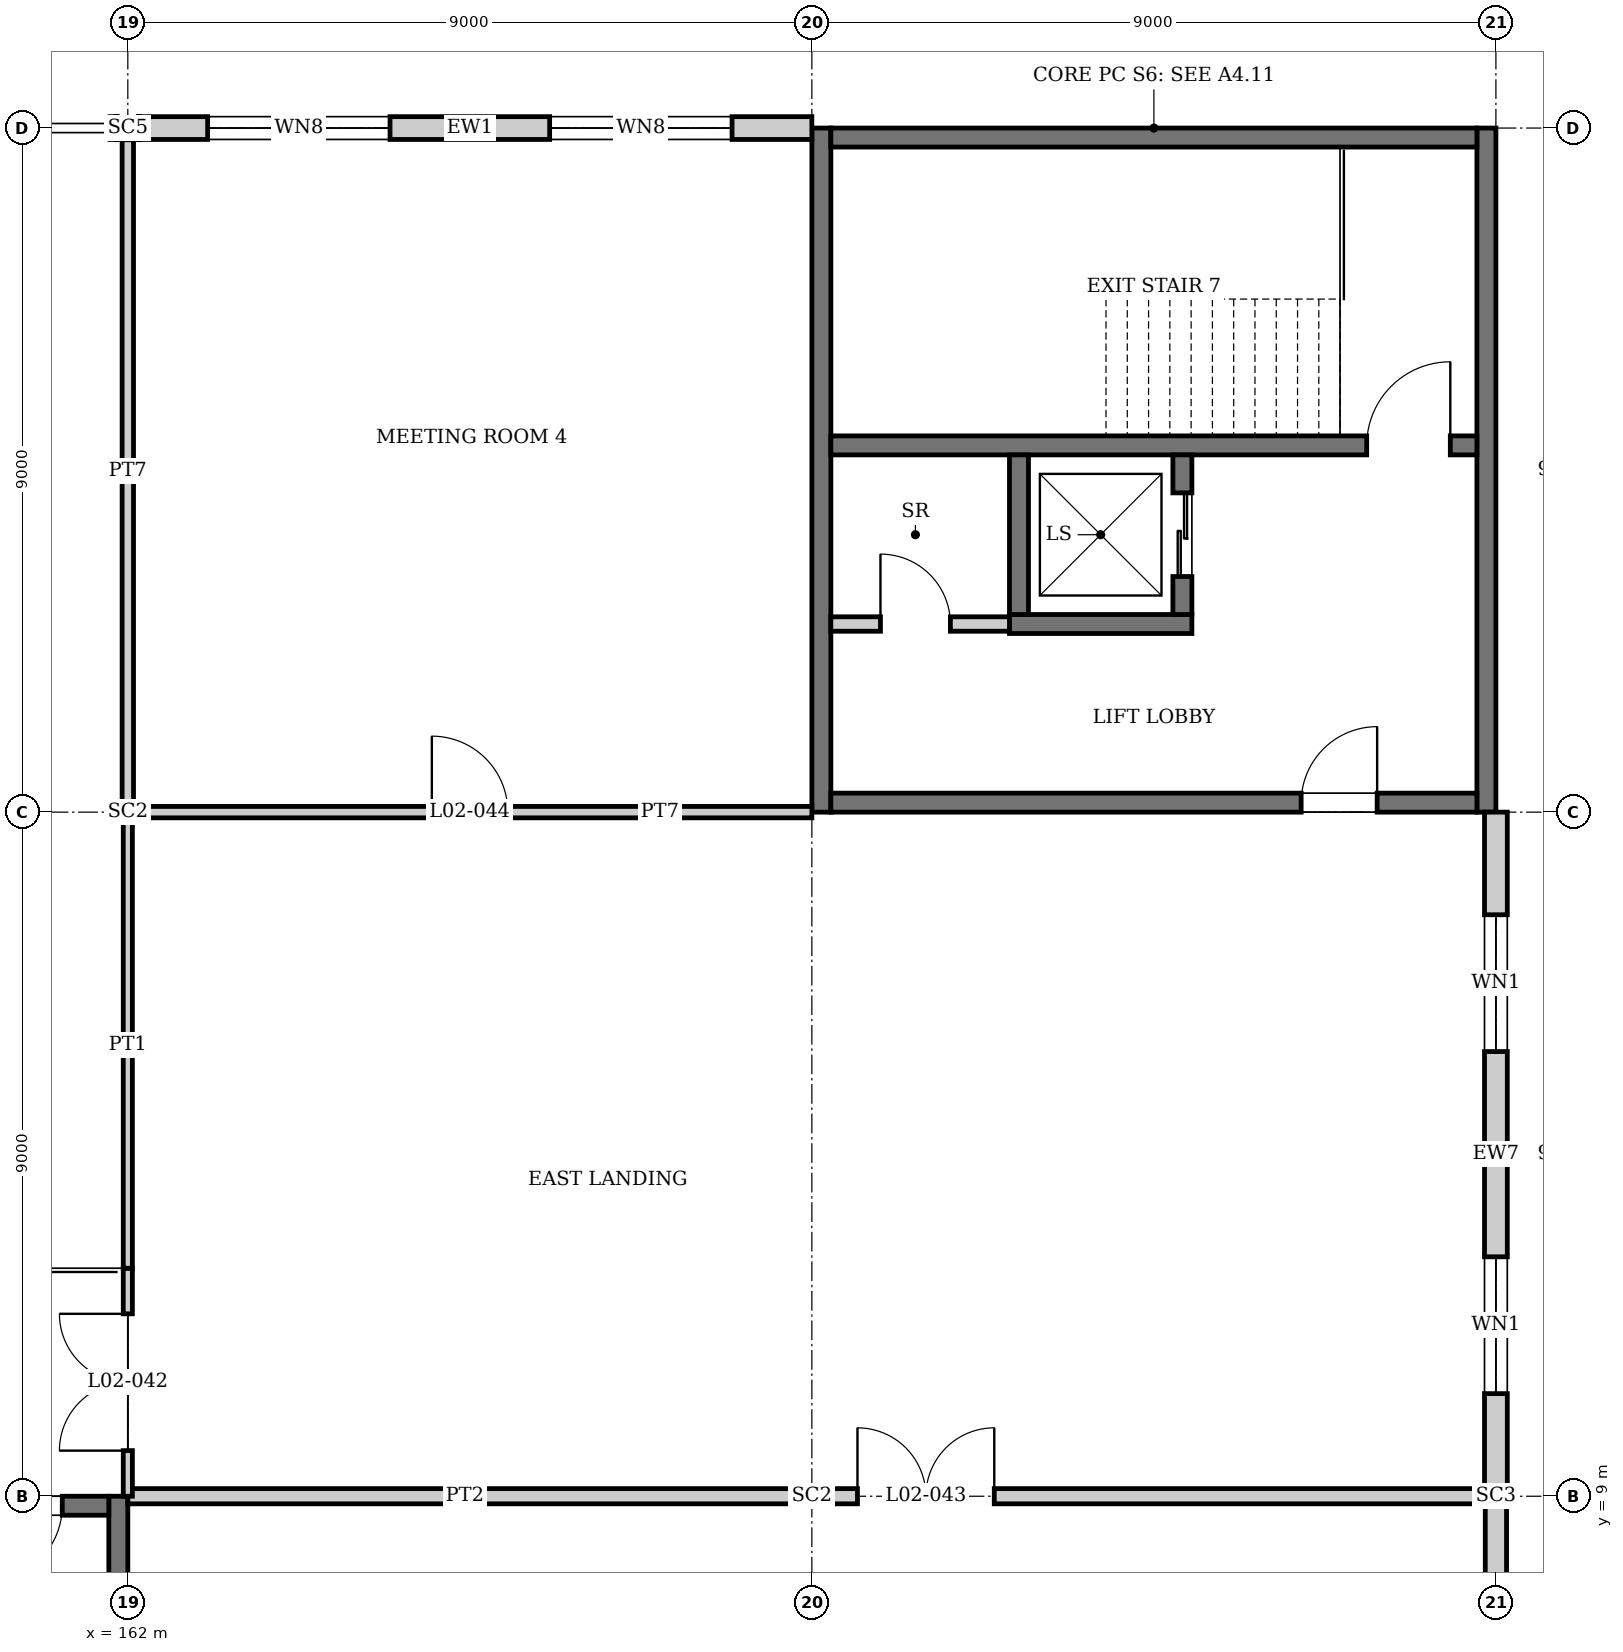
"""IFC4 building model, lengths in metres.
Left out: names, types, materials, properties, quantities, classifications, styles, units other than length and angle.
Written with IfcOpenShell. Run it as: python <this file> out.ifc"""

import sys

from ifc_helpers import new_model, si_unit, direction, frame, frame_2d, origin, origin_2d, place, context, subcontext, project, spatial, rectangle, i_section, extrude, element, fill, save


model = new_model("IFC4")
c1 = context("Model", 3, precision=1e-05, world=origin(), true_north=direction((0.0, 1.0)))
c2 = subcontext(c1, "Body", "Model", "MODEL_VIEW")
j1 = project(units=[si_unit("LENGTHUNIT", "METRE"), si_unit("PLANEANGLEUNIT", "RADIAN")], contexts=[c1])
p1 = place(None, origin())
s1 = spatial("IfcSite", under=j1, at=p1, CompositionType="ELEMENT")
p2 = place(p1, origin())
s2 = spatial("IfcBuilding", under=s1, at=p2, CompositionType="ELEMENT")
p3 = place(p2, frame((0.0, 0.0, 10.5)))
s3 = spatial("IfcBuildingStorey", under=s2, at=p3, CompositionType="ELEMENT", Elevation=10.5)
p4 = place(p3, frame((162.0, 18.0, 0.0), z_axis=(0.0, 0.0, 1.0), x_axis=(0.0, 1.0, 0.0)))
e1 = element("IfcColumn", 1, at=p4, inside=s3, PredefinedType="COLUMN", context=c2, shape_type="SweptSolid", body=[
    extrude(i_section(OverallWidth=0.256, OverallDepth=0.26, WebThickness=0.01, FlangeThickness=0.017, at=origin_2d()), origin(), (0.0, 0.0, 1.0), 4.5),
])
p5 = place(p3, frame((162.0, 27.0, 0.0), z_axis=(0.0, 0.0, 1.0), x_axis=(0.0, 1.0, 0.0)))
e2 = element("IfcColumn", 2, at=p5, inside=s3, PredefinedType="COLUMN", context=c2, shape_type="SweptSolid", body=[
    extrude(i_section(OverallWidth=0.305, OverallDepth=0.308, WebThickness=0.01, FlangeThickness=0.015, at=origin_2d()), origin(), (0.0, 0.0, 1.0), 4.5),
])
p6 = place(p3, frame((171.0, 9.0, 0.0), z_axis=(0.0, 0.0, 1.0), x_axis=(0.0, 1.0, 0.0)))
e3 = element("IfcColumn", 3, at=p6, inside=s3, PredefinedType="COLUMN", context=c2, shape_type="SweptSolid", body=[
    extrude(i_section(OverallWidth=0.256, OverallDepth=0.26, WebThickness=0.01, FlangeThickness=0.017, at=origin_2d()), origin(), (0.0, 0.0, 1.0), 4.5),
])
p7 = place(p3, frame((180.0, 9.0, 0.0), z_axis=(0.0, 0.0, 1.0), x_axis=(0.0, 1.0, 0.0)))
e4 = element("IfcColumn", 4, at=p7, inside=s3, PredefinedType="COLUMN", context=c2, shape_type="SweptSolid", body=[
    extrude(i_section(OverallWidth=0.254, OverallDepth=0.254, WebThickness=0.009, FlangeThickness=0.014, at=origin_2d()), origin(), (0.0, 0.0, 1.0), 4.5),
])
p8 = place(p3, frame((161.875, 0.0, 0.0), z_axis=(0.0, 0.0, 1.0), x_axis=(0.0, 1.0, 0.0)))
e5 = element("IfcWall", 5, at=p8, inside=s3, PredefinedType="SHEAR", context=c2, shape_type="SweptSolid", body=[
    extrude(rectangle(XDim=9.0, YDim=0.25, at=frame_2d((4.5, 0.0))), origin(), (0.0, 0.0, 1.0), 4.35),
])
p9 = place(p3, frame((153.25, 8.875, 0.0), z_axis=(0.0, 0.0, 1.0), x_axis=(1.0, 0.0, 0.0)))
e6 = element("IfcWall", 6, at=p9, inside=s3, PredefinedType="SHEAR", context=c2, shape_type="SweptSolid", body=[
    extrude(rectangle(XDim=8.5, YDim=0.25, at=frame_2d((4.25, 0.0))), origin(), (0.0, 0.0, 1.0), 4.35),
])
p10 = place(p9, frame((6.887, 0.0, 0.0)))
e7 = element("IfcOpeningElement", 7, at=p10, cuts=e6, PredefinedType="OPENING", context=c2, shape_type="SweptSolid", body=[
    extrude(rectangle(XDim=1.0, YDim=2.1, at=frame_2d((0.5, 1.05))), frame((0.0, 0.135, 0.0), z_axis=(0.0, -1.0, 0.0), x_axis=(1.0, 0.0, 0.0)), (0.0, 0.0, 1.0), 0.27),
])
for number, where, z_axis, x_axis in (
    (8, (171.125, 18.0, 0.0), (0.0, 0.0, 1.0), (0.0, 1.0, 0.0)),
    (9, (179.875, 18.0, 0.0), (0.0, 0.0, 1.0), (0.0, 1.0, 0.0)),
):
    element("IfcWall", number, at=place(p3, frame(where, z_axis=z_axis, x_axis=x_axis)), inside=s3, PredefinedType="SHEAR", context=c2, shape_type="SweptSolid", body=[
        extrude(rectangle(XDim=9.0, YDim=0.25, at=frame_2d((4.5, 0.0))), origin(), (0.0, 0.0, 1.0), 4.35),
    ])
p11 = place(p3, frame((171.25, 18.125, 0.0), z_axis=(0.0, 0.0, 1.0), x_axis=(1.0, 0.0, 0.0)))
e10 = element("IfcWall", 10, at=p11, inside=s3, PredefinedType="SHEAR", context=c2, shape_type="SweptSolid", body=[
    extrude(rectangle(XDim=8.5, YDim=0.25, at=frame_2d((4.25, 0.0))), origin(), (0.0, 0.0, 1.0), 4.35),
])
p12 = place(p11, frame((6.188, 0.0, 0.0)))
e11 = element("IfcOpeningElement", 11, at=p12, cuts=e10, PredefinedType="OPENING", context=c2, shape_type="SweptSolid", body=[
    extrude(rectangle(XDim=1.0, YDim=2.1, at=frame_2d((0.5, 1.05))), frame((0.0, 0.135, 0.0), z_axis=(0.0, -1.0, 0.0), x_axis=(1.0, 0.0, 0.0)), (0.0, 0.0, 1.0), 0.27),
])
p13 = place(p3, frame((171.25, 26.875, 0.0), z_axis=(0.0, 0.0, 1.0), x_axis=(1.0, 0.0, 0.0)))
e12 = element("IfcWall", 12, at=p13, inside=s3, PredefinedType="SHEAR", context=c2, shape_type="SweptSolid", body=[
    extrude(rectangle(XDim=8.5, YDim=0.25, at=frame_2d((4.25, 0.0))), origin(), (0.0, 0.0, 1.0), 4.35),
])
p14 = place(p3, frame((162.154, 27.0, 0.0), z_axis=(0.0, 0.0, 1.0), x_axis=(1.0, 0.0, 0.0)))
e13 = element("IfcWall", 13, at=p14, inside=s3, PredefinedType="SOLIDWALL", context=c2, shape_type="SweptSolid", body=[
    extrude(rectangle(XDim=8.846, YDim=0.3, at=frame_2d((4.423, 0.0))), origin(), (0.0, 0.0, 1.0), 3.991),
])
p15 = place(p14, frame((0.896, 0.0, 0.9)))
e14 = element("IfcOpeningElement", 14, at=p15, cuts=e13, PredefinedType="OPENING", context=c2, shape_type="SweptSolid", body=[
    extrude(rectangle(XDim=2.4, YDim=2.1, at=frame_2d((1.2, 1.05))), frame((0.0, 0.16, 0.0), z_axis=(0.0, -1.0, 0.0), x_axis=(1.0, 0.0, 0.0)), (0.0, 0.0, 1.0), 0.32),
])
p16 = place(p14, frame((5.396, 0.0, 0.9)))
e15 = element("IfcOpeningElement", 15, at=p16, cuts=e13, PredefinedType="OPENING", context=c2, shape_type="SweptSolid", body=[
    extrude(rectangle(XDim=2.4, YDim=2.1, at=frame_2d((1.2, 1.05))), frame((0.0, 0.16, 0.0), z_axis=(0.0, -1.0, 0.0), x_axis=(1.0, 0.0, 0.0)), (0.0, 0.0, 1.0), 0.32),
])
p17 = place(p3, frame((180.0, 0.127, 0.0), z_axis=(0.0, 0.0, 1.0), x_axis=(0.0, 1.0, 0.0)))
e16 = element("IfcWall", 16, at=p17, inside=s3, PredefinedType="SOLIDWALL", context=c2, shape_type="SweptSolid", body=[
    extrude(rectangle(XDim=8.746, YDim=0.28, at=frame_2d((4.373, 0.0))), origin(), (0.0, 0.0, 1.0), 3.991),
])
p18 = place(p3, frame((180.0, 9.127, 0.0), z_axis=(0.0, 0.0, 1.0), x_axis=(0.0, 1.0, 0.0)))
e17 = element("IfcWall", 17, at=p18, inside=s3, PredefinedType="SOLIDWALL", context=c2, shape_type="SweptSolid", body=[
    extrude(rectangle(XDim=8.873, YDim=0.3, at=frame_2d((4.437, 0.0))), origin(), (0.0, 0.0, 1.0), 3.991),
])
p19 = place(p18, frame((1.223, 0.0, 0.9)))
e18 = element("IfcOpeningElement", 18, at=p19, cuts=e17, PredefinedType="OPENING", context=c2, shape_type="SweptSolid", body=[
    extrude(rectangle(XDim=1.8, YDim=2.4, at=frame_2d((0.9, 1.2))), frame((0.0, 0.16, 0.0), z_axis=(0.0, -1.0, 0.0), x_axis=(1.0, 0.0, 0.0)), (0.0, 0.0, 1.0), 0.32),
])
p20 = place(p18, frame((5.723, 0.0, 0.9)))
e19 = element("IfcOpeningElement", 19, at=p20, cuts=e17, PredefinedType="OPENING", context=c2, shape_type="SweptSolid", body=[
    extrude(rectangle(XDim=1.8, YDim=2.4, at=frame_2d((0.9, 1.2))), frame((0.0, 0.16, 0.0), z_axis=(0.0, -1.0, 0.0), x_axis=(1.0, 0.0, 0.0)), (0.0, 0.0, 1.0), 0.32),
])
p21 = place(p3, frame((179.75, 22.825, 0.0), z_axis=(0.0, 0.0, 1.0), x_axis=(-1.0, 0.0, 0.0)))
e20 = element("IfcWall", 20, at=p21, inside=s3, PredefinedType="SOLIDWALL", context=c2, shape_type="SweptSolid", body=[
    extrude(rectangle(XDim=8.5, YDim=0.25, at=frame_2d((4.25, 0.0))), origin(), (0.0, 0.0, 1.0), 4.35),
])
p22 = place(p21, frame((0.35, 0.0, 0.0)))
e21 = element("IfcOpeningElement", 21, at=p22, cuts=e20, PredefinedType="OPENING", context=c2, shape_type="SweptSolid", body=[
    extrude(rectangle(XDim=1.1, YDim=2.1, at=frame_2d((0.55, 1.05))), frame((0.0, 0.135, 0.0), z_axis=(0.0, -1.0, 0.0), x_axis=(1.0, 0.0, 0.0)), (0.0, 0.0, 1.0), 0.27),
])
p23 = place(p3, frame((173.6, 20.475, 0.0), z_axis=(0.0, 0.0, 1.0), x_axis=(1.0, 0.0, 0.0)))
e22 = element("IfcWall", 22, at=p23, inside=s3, PredefinedType="SOLIDWALL", context=c2, shape_type="SweptSolid", body=[
    extrude(rectangle(XDim=2.4, YDim=0.25, at=frame_2d((1.2, 0.0))), origin(), (0.0, 0.0, 1.0), 4.35),
])
p24 = place(p3, frame((173.725, 20.6, 0.0), z_axis=(0.0, 0.0, 1.0), x_axis=(0.0, 1.0, 0.0)))
e23 = element("IfcWall", 23, at=p24, inside=s3, PredefinedType="SOLIDWALL", context=c2, shape_type="SweptSolid", body=[
    extrude(rectangle(XDim=2.1, YDim=0.25, at=frame_2d((1.05, 0.0))), origin(), (0.0, 0.0, 1.0), 4.35),
])
p25 = place(p3, frame((175.875, 20.6, 0.0), z_axis=(0.0, 0.0, 1.0), x_axis=(0.0, 1.0, 0.0)))
e24 = element("IfcWall", 24, at=p25, inside=s3, PredefinedType="SOLIDWALL", context=c2, shape_type="SweptSolid", body=[
    extrude(rectangle(XDim=2.1, YDim=0.25, at=frame_2d((1.05, 0.0))), origin(), (0.0, 0.0, 1.0), 4.35),
])
p26 = place(p25, frame((0.5, 0.0, 0.0)))
e25 = element("IfcOpeningElement", 25, at=p26, cuts=e24, PredefinedType="OPENING", context=c2, shape_type="SweptSolid", body=[
    extrude(rectangle(XDim=1.1, YDim=2.1, at=frame_2d((0.55, 1.05))), frame((0.0, 0.135, 0.0), z_axis=(0.0, -1.0, 0.0), x_axis=(1.0, 0.0, 0.0)), (0.0, 0.0, 1.0), 0.27),
])
p27 = place(p3, frame((162.0, 9.0, 0.0), z_axis=(0.0, 0.0, 1.0), x_axis=(1.0, 0.0, 0.0)))
e26 = element("IfcWall", 26, at=p27, inside=s3, PredefinedType="PARTITIONING", context=c2, shape_type="SweptSolid", body=[
    extrude(rectangle(XDim=8.87, YDim=0.2, at=frame_2d((4.435, 0.0))), origin(), (0.0, 0.0, 1.0), 3.822),
])
p28 = place(p3, frame((171.13, 9.0, 0.0), z_axis=(0.0, 0.0, 1.0), x_axis=(1.0, 0.0, 0.0)))
e27 = element("IfcWall", 27, at=p28, inside=s3, PredefinedType="PARTITIONING", context=c2, shape_type="SweptSolid", body=[
    extrude(rectangle(XDim=8.743, YDim=0.2, at=frame_2d((4.372, 0.0))), origin(), (0.0, 0.0, 1.0), 3.822),
])
p29 = place(p28, frame((0.47, 0.0, 0.0)))
e28 = element("IfcOpeningElement", 28, at=p29, cuts=e27, PredefinedType="OPENING", context=c2, shape_type="SweptSolid", body=[
    extrude(rectangle(XDim=1.8, YDim=2.1, at=frame_2d((0.9, 1.05))), frame((0.0, 0.11, 0.0), z_axis=(0.0, -1.0, 0.0), x_axis=(1.0, 0.0, 0.0)), (0.0, 0.0, 1.0), 0.22),
])
p30 = place(p3, frame((162.13, 18.0, 0.0), z_axis=(0.0, 0.0, 1.0), x_axis=(1.0, 0.0, 0.0)))
e29 = element("IfcWall", 29, at=p30, inside=s3, PredefinedType="PARTITIONING", context=c2, shape_type="SweptSolid", body=[
    extrude(rectangle(XDim=8.87, YDim=0.15, at=frame_2d((4.435, 0.0))), origin(), (0.0, 0.0, 1.0), 3.822),
])
p31 = place(p30, frame((3.87, 0.0, 0.0)))
e30 = element("IfcOpeningElement", 30, at=p31, cuts=e29, PredefinedType="OPENING", context=c2, shape_type="SweptSolid", body=[
    extrude(rectangle(XDim=1.0, YDim=2.1, at=frame_2d((0.5, 1.05))), frame((0.0, 0.085, 0.0), z_axis=(0.0, -1.0, 0.0), x_axis=(1.0, 0.0, 0.0)), (0.0, 0.0, 1.0), 0.17),
])
p32 = place(p3, frame((171.25, 20.475, 0.0), z_axis=(0.0, 0.0, 1.0), x_axis=(1.0, 0.0, 0.0)))
e31 = element("IfcWall", 31, at=p32, inside=s3, PredefinedType="PARTITIONING", context=c2, shape_type="SweptSolid", body=[
    extrude(rectangle(XDim=2.35, YDim=0.19, at=frame_2d((1.175, 0.0))), origin(), (0.0, 0.0, 1.0), 4.35),
])
p33 = place(p32, frame((0.653, 0.0, 0.0)))
e32 = element("IfcOpeningElement", 32, at=p33, cuts=e31, PredefinedType="OPENING", context=c2, shape_type="SweptSolid", body=[
    extrude(rectangle(XDim=0.92, YDim=2.1, at=frame_2d((0.46, 1.05))), frame((0.0, 0.105, 0.0), z_axis=(0.0, -1.0, 0.0), x_axis=(1.0, 0.0, 0.0)), (0.0, 0.0, 1.0), 0.21),
])
p34 = place(p3, frame((162.0, 9.0, 0.0), z_axis=(0.0, 0.0, 1.0), x_axis=(0.0, 1.0, 0.0)))
e33 = element("IfcWall", 33, at=p34, inside=s3, PredefinedType="PARTITIONING", context=c2, shape_type="SweptSolid", body=[
    extrude(rectangle(XDim=3.0, YDim=0.12, at=frame_2d((1.5, 0.0))), origin(), (0.0, 0.0, 1.0), 2.414),
])
p35 = place(p34, frame((0.6, 0.0, 0.0)))
e34 = element("IfcOpeningElement", 34, at=p35, cuts=e33, PredefinedType="OPENING", context=c2, shape_type="SweptSolid", body=[
    extrude(rectangle(XDim=1.8, YDim=2.1, at=frame_2d((0.9, 1.05))), frame((0.0, 0.07, 0.0), z_axis=(0.0, -1.0, 0.0), x_axis=(1.0, 0.0, 0.0)), (0.0, 0.0, 1.0), 0.14),
])
p36 = place(p3, frame((162.0, 12.0, 0.0), z_axis=(0.0, 0.0, 1.0), x_axis=(0.0, 1.0, 0.0)))
e35 = element("IfcWall", 35, at=p36, inside=s3, PredefinedType="PARTITIONING", context=c2, shape_type="SweptSolid", body=[
    extrude(rectangle(XDim=5.87, YDim=0.12, at=frame_2d((2.935, 0.0))), origin(), (0.0, 0.0, 1.0), 4.35),
])
p37 = place(p3, frame((162.0, 18.13, 0.0), z_axis=(0.0, 0.0, 1.0), x_axis=(0.0, 1.0, 0.0)))
e36 = element("IfcWall", 36, at=p37, inside=s3, PredefinedType="PARTITIONING", context=c2, shape_type="SweptSolid", body=[
    extrude(rectangle(XDim=8.716, YDim=0.15, at=frame_2d((4.358, 0.0))), origin(), (0.0, 0.0, 1.0), 4.35),
])
p38 = place(p15, origin())
e37 = element("IfcWindow", 37, at=p38, inside=s3, PartitioningType="SINGLE_PANEL", PredefinedType="WINDOW", context=c2, shape_type="SweptSolid", body=[
    extrude(rectangle(XDim=2.4, YDim=2.1, at=frame_2d((1.2, 1.05))), frame((0.0, 0.03, 0.0), z_axis=(0.0, -1.0, 0.0), x_axis=(1.0, 0.0, 0.0)), (0.0, 0.0, 1.0), 0.06),
])
fill(e14, e37)
p39 = place(p16, origin())
e38 = element("IfcWindow", 38, at=p39, inside=s3, PartitioningType="SINGLE_PANEL", PredefinedType="WINDOW", context=c2, shape_type="SweptSolid", body=[
    extrude(rectangle(XDim=2.4, YDim=2.1, at=frame_2d((1.2, 1.05))), frame((0.0, 0.03, 0.0), z_axis=(0.0, -1.0, 0.0), x_axis=(1.0, 0.0, 0.0)), (0.0, 0.0, 1.0), 0.06),
])
fill(e15, e38)
p40 = place(p19, origin())
e39 = element("IfcWindow", 39, at=p40, inside=s3, PartitioningType="SINGLE_PANEL", PredefinedType="WINDOW", context=c2, shape_type="SweptSolid", body=[
    extrude(rectangle(XDim=1.8, YDim=2.4, at=frame_2d((0.9, 1.2))), frame((0.0, 0.03, 0.0), z_axis=(0.0, -1.0, 0.0), x_axis=(1.0, 0.0, 0.0)), (0.0, 0.0, 1.0), 0.06),
])
fill(e18, e39)
p41 = place(p20, origin())
e40 = element("IfcWindow", 40, at=p41, inside=s3, PartitioningType="SINGLE_PANEL", PredefinedType="WINDOW", context=c2, shape_type="SweptSolid", body=[
    extrude(rectangle(XDim=1.8, YDim=2.4, at=frame_2d((0.9, 1.2))), frame((0.0, 0.03, 0.0), z_axis=(0.0, -1.0, 0.0), x_axis=(1.0, 0.0, 0.0)), (0.0, 0.0, 1.0), 0.06),
])
fill(e19, e40)
p42 = place(p26, origin())
e41 = element("IfcDoor", 41, at=p42, inside=s3, OperationType="DOUBLE_DOOR_SLIDING", PredefinedType="DOOR", context=c2, shape_type="SweptSolid", body=[
    extrude(rectangle(XDim=1.1, YDim=2.1, at=frame_2d((0.55, 1.05))), frame((0.0, 0.025, 0.0), z_axis=(0.0, -1.0, 0.0), x_axis=(1.0, 0.0, 0.0)), (0.0, 0.0, 1.0), 0.05),
])
fill(e25, e41)
p43 = place(p10, frame((1.0, 0.0, 0.0), z_axis=(0.0, 0.0, 1.0), x_axis=(-1.0, 0.0, 0.0)))
e42 = element("IfcDoor", 42, at=p43, inside=s3, OperationType="SINGLE_SWING_RIGHT", PredefinedType="DOOR", context=c2, shape_type="SweptSolid", body=[
    extrude(rectangle(XDim=1.0, YDim=2.1, at=frame_2d((0.5, 1.05))), frame((0.0, 0.025, 0.0), z_axis=(0.0, -1.0, 0.0), x_axis=(1.0, 0.0, 0.0)), (0.0, 0.0, 1.0), 0.05),
])
fill(e7, e42)
p44 = place(p35, origin())
e43 = element("IfcDoor", 43, at=p44, inside=s3, OperationType="DOUBLE_DOOR_SINGLE_SWING", PredefinedType="DOOR", context=c2, shape_type="SweptSolid", body=[
    extrude(rectangle(XDim=1.8, YDim=2.1, at=frame_2d((0.9, 1.05))), frame((0.0, 0.025, 0.0), z_axis=(0.0, -1.0, 0.0), x_axis=(1.0, 0.0, 0.0)), (0.0, 0.0, 1.0), 0.05),
])
fill(e34, e43)
p45 = place(p29, origin())
e44 = element("IfcDoor", 44, at=p45, inside=s3, OperationType="DOUBLE_DOOR_SINGLE_SWING", PredefinedType="DOOR", context=c2, shape_type="SweptSolid", body=[
    extrude(rectangle(XDim=1.8, YDim=2.1, at=frame_2d((0.9, 1.05))), frame((0.0, 0.025, 0.0), z_axis=(0.0, -1.0, 0.0), x_axis=(1.0, 0.0, 0.0)), (0.0, 0.0, 1.0), 0.05),
])
fill(e28, e44)
p46 = place(p31, origin())
e45 = element("IfcDoor", 45, at=p46, inside=s3, OperationType="SINGLE_SWING_LEFT", PredefinedType="DOOR", context=c2, shape_type="SweptSolid", body=[
    extrude(rectangle(XDim=1.0, YDim=2.1, at=frame_2d((0.5, 1.05))), frame((0.0, 0.025, 0.0), z_axis=(0.0, -1.0, 0.0), x_axis=(1.0, 0.0, 0.0)), (0.0, 0.0, 1.0), 0.05),
])
fill(e30, e45)
p47 = place(p22, frame((1.1, 0.0, 0.0), z_axis=(0.0, 0.0, 1.0), x_axis=(-1.0, 0.0, 0.0)))
e46 = element("IfcDoor", 46, at=p47, inside=s3, OperationType="SINGLE_SWING_RIGHT", PredefinedType="DOOR", context=c2, shape_type="SweptSolid", body=[
    extrude(rectangle(XDim=1.1, YDim=2.1, at=frame_2d((0.55, 1.05))), frame((0.0, 0.025, 0.0), z_axis=(0.0, -1.0, 0.0), x_axis=(1.0, 0.0, 0.0)), (0.0, 0.0, 1.0), 0.05),
])
fill(e21, e46)
p48 = place(p12, origin())
e47 = element("IfcDoor", 47, at=p48, inside=s3, OperationType="SINGLE_SWING_RIGHT", PredefinedType="DOOR", context=c2, shape_type="SweptSolid", body=[
    extrude(rectangle(XDim=1.0, YDim=2.1, at=frame_2d((0.5, 1.05))), frame((0.0, 0.025, 0.0), z_axis=(0.0, -1.0, 0.0), x_axis=(1.0, 0.0, 0.0)), (0.0, 0.0, 1.0), 0.05),
])
fill(e11, e47)
p49 = place(p33, origin())
e48 = element("IfcDoor", 48, at=p49, inside=s3, OperationType="SINGLE_SWING_LEFT", PredefinedType="DOOR", context=c2, shape_type="SweptSolid", body=[
    extrude(rectangle(XDim=0.92, YDim=2.1, at=frame_2d((0.46, 1.05))), frame((0.0, 0.025, 0.0), z_axis=(0.0, -1.0, 0.0), x_axis=(1.0, 0.0, 0.0)), (0.0, 0.0, 1.0), 0.05),
])
fill(e32, e48)
save(model, sys.argv[1])
